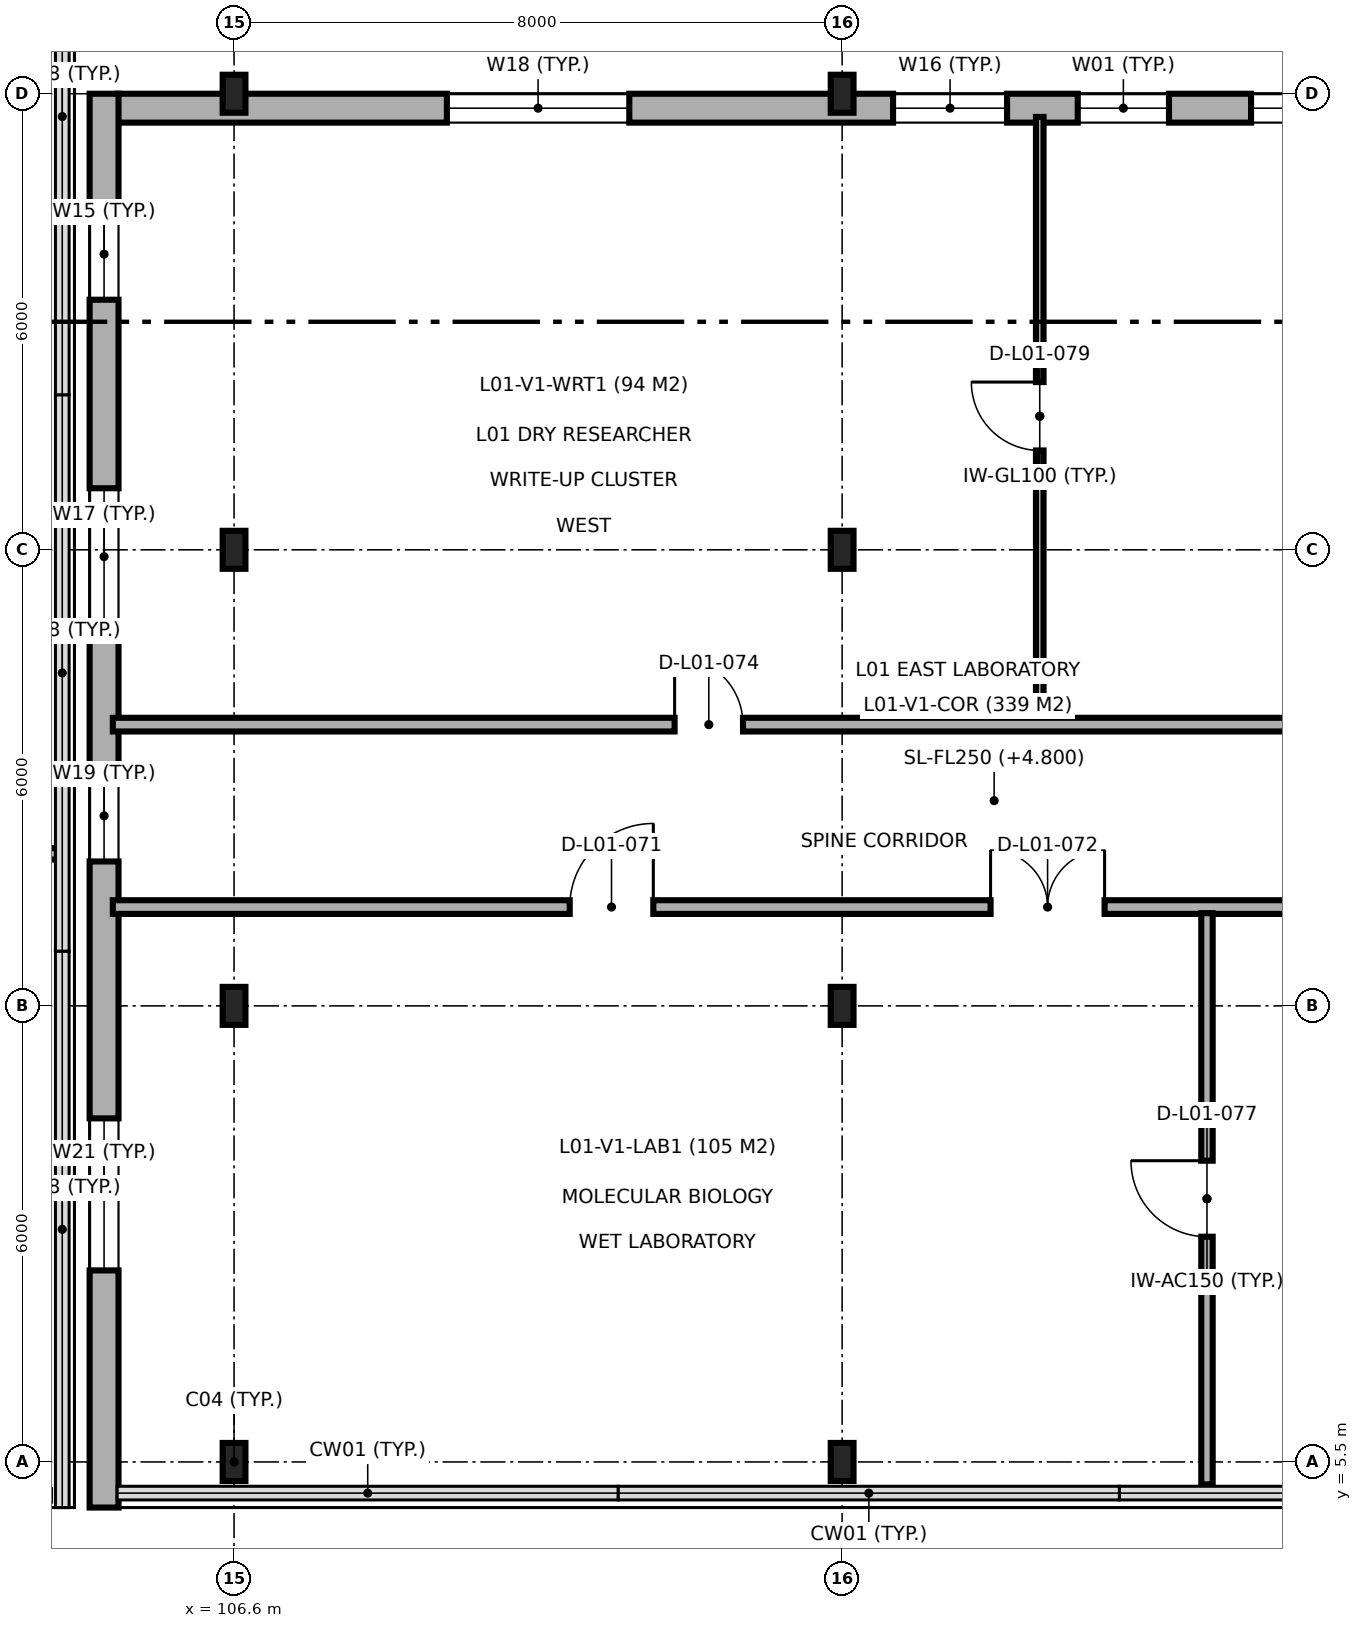
"""IFC4 building model, lengths in metres.
Left out: names, types, materials, properties, quantities, classifications, styles, units other than length and angle.
Written with IfcOpenShell. Run it as: python <this file> out.ifc"""

import sys

from ifc_helpers import new_model, si_unit, direction, frame, frame_2d, origin, origin_2d, place, context, subcontext, project, spatial, rectangle, i_section, extrude, element, fill, save


model = new_model("IFC4")
c1 = context("Model", 3, precision=1e-05, world=origin(), true_north=direction((0.0, 1.0)))
c2 = subcontext(c1, "Body", "Model", "MODEL_VIEW")
j1 = project(units=[si_unit("LENGTHUNIT", "METRE"), si_unit("PLANEANGLEUNIT", "RADIAN")], contexts=[c1])
p1 = place(None, origin())
s1 = spatial("IfcSite", under=j1, at=p1, CompositionType="ELEMENT")
p2 = place(p1, origin())
s2 = spatial("IfcBuilding", under=s1, at=p2, CompositionType="ELEMENT")
p3 = place(p2, frame((0.0, 0.0, 4.8)))
s3 = spatial("IfcBuildingStorey", under=s2, at=p3, CompositionType="ELEMENT", Elevation=4.8)
for number, where, z_axis, x_axis in (
    (1, (106.6, 5.5, 0.0), (0.0, 0.0, 1.0), (1.0, 0.0, 0.0)),
    (2, (106.6, 11.5, 0.0), (0.0, 0.0, 1.0), (1.0, 0.0, 0.0)),
    (3, (106.6, 17.5, 0.0), (0.0, 0.0, 1.0), (1.0, 0.0, 0.0)),
    (4, (106.6, 23.5, 0.0), (0.0, 0.0, 1.0), (1.0, 0.0, 0.0)),
    (5, (114.6, 5.5, 0.0), (0.0, 0.0, 1.0), (1.0, 0.0, 0.0)),
    (6, (114.6, 11.5, 0.0), (0.0, 0.0, 1.0), (1.0, 0.0, 0.0)),
    (7, (114.6, 17.5, 0.0), (0.0, 0.0, 1.0), (1.0, 0.0, 0.0)),
    (8, (114.6, 23.5, 0.0), (0.0, 0.0, 1.0), (1.0, 0.0, 0.0)),
):
    element("IfcColumn", number, at=place(p3, frame(where, z_axis=z_axis, x_axis=x_axis)), inside=s3, PredefinedType="COLUMN", context=c2, shape_type="SweptSolid", body=[
        extrude(i_section(OverallWidth=0.3, OverallDepth=0.5, WebThickness=0.014, FlangeThickness=0.028, FilletRadius=0.027, at=origin_2d()), origin(), (0.0, 0.0, 1.0), 4.5),
    ])
p4 = place(p3, frame((138.962, 23.31, 0.0), z_axis=(0.0, 0.0, 1.0), x_axis=(-1.0, 0.0, 0.0)))
e9 = element("IfcWall", 9, at=p4, inside=s3, PredefinedType="SOLIDWALL", context=c2, shape_type="SweptSolid", body=[
    extrude(rectangle(XDim=33.9, YDim=0.38, at=frame_2d((16.95, 0.0))), origin(), (0.0, 0.0, 1.0), 4.25),
])
p5 = place(p4, frame((3.682, 0.0, 0.9)))
e10 = element("IfcOpeningElement", 10, at=p5, cuts=e9, PredefinedType="OPENING", context=c2, shape_type="SweptSolid", body=[
    extrude(rectangle(XDim=1.2, YDim=2.1, at=frame_2d((0.6, 1.05))), frame((0.0, 0.2, 0.0), z_axis=(0.0, -1.0, 0.0), x_axis=(1.0, 0.0, 0.0)), (0.0, 0.0, 1.0), 0.4),
])
p6 = place(p4, frame((11.642, 0.0, 0.9)))
e11 = element("IfcOpeningElement", 11, at=p6, cuts=e9, PredefinedType="OPENING", context=c2, shape_type="SweptSolid", body=[
    extrude(rectangle(XDim=1.8, YDim=2.1, at=frame_2d((0.9, 1.05))), frame((0.0, 0.2, 0.0), z_axis=(0.0, -1.0, 0.0), x_axis=(1.0, 0.0, 0.0)), (0.0, 0.0, 1.0), 0.4),
])
p7 = place(p4, frame((17.182, 0.0, 0.9)))
e12 = element("IfcOpeningElement", 12, at=p7, cuts=e9, PredefinedType="OPENING", context=c2, shape_type="SweptSolid", body=[
    extrude(rectangle(XDim=1.8, YDim=2.1, at=frame_2d((0.9, 1.05))), frame((0.0, 0.2, 0.0), z_axis=(0.0, -1.0, 0.0), x_axis=(1.0, 0.0, 0.0)), (0.0, 0.0, 1.0), 0.4),
])
p8 = place(p4, frame((20.062, 0.0, 0.9)))
e13 = element("IfcOpeningElement", 13, at=p8, cuts=e9, PredefinedType="OPENING", context=c2, shape_type="SweptSolid", body=[
    extrude(rectangle(XDim=1.2, YDim=1.8, at=frame_2d((0.6, 0.9))), frame((0.0, 0.2, 0.0), z_axis=(0.0, -1.0, 0.0), x_axis=(1.0, 0.0, 0.0)), (0.0, 0.0, 1.0), 0.4),
])
p9 = place(p4, frame((22.192, 0.0, 0.9)))
e14 = element("IfcOpeningElement", 14, at=p9, cuts=e9, PredefinedType="OPENING", context=c2, shape_type="SweptSolid", body=[
    extrude(rectangle(XDim=1.5, YDim=1.5, at=frame_2d((0.75, 0.75))), frame((0.0, 0.2, 0.0), z_axis=(0.0, -1.0, 0.0), x_axis=(1.0, 0.0, 0.0)), (0.0, 0.0, 1.0), 0.4),
])
p10 = place(p4, frame((27.162, 0.0, 0.9)))
e15 = element("IfcOpeningElement", 15, at=p10, cuts=e9, PredefinedType="OPENING", context=c2, shape_type="SweptSolid", body=[
    extrude(rectangle(XDim=2.4, YDim=1.5, at=frame_2d((1.2, 0.75))), frame((0.0, 0.2, 0.0), z_axis=(0.0, -1.0, 0.0), x_axis=(1.0, 0.0, 0.0)), (0.0, 0.0, 1.0), 0.4),
])
p11 = place(p3, frame((104.89, 23.5, 0.0), z_axis=(0.0, 0.0, 1.0), x_axis=(0.0, -1.0, 0.0)))
e16 = element("IfcWall", 16, at=p11, inside=s3, PredefinedType="SOLIDWALL", context=c2, shape_type="SweptSolid", body=[
    extrude(rectangle(XDim=18.6, YDim=0.38, at=frame_2d((9.3, 0.0))), origin(), (0.0, 0.0, 1.0), 4.25),
])
p12 = place(p11, frame((1.51, 0.0, 0.9)))
e17 = element("IfcOpeningElement", 17, at=p12, cuts=e16, PredefinedType="OPENING", context=c2, shape_type="SweptSolid", body=[
    extrude(rectangle(XDim=1.2, YDim=1.5, at=frame_2d((0.6, 0.75))), frame((0.0, 0.2, 0.0), z_axis=(0.0, -1.0, 0.0), x_axis=(1.0, 0.0, 0.0)), (0.0, 0.0, 1.0), 0.4),
])
p13 = place(p11, frame((5.19, 0.0, 0.9)))
e18 = element("IfcOpeningElement", 18, at=p13, cuts=e16, PredefinedType="OPENING", context=c2, shape_type="SweptSolid", body=[
    extrude(rectangle(XDim=1.8, YDim=1.5, at=frame_2d((0.9, 0.75))), frame((0.0, 0.2, 0.0), z_axis=(0.0, -1.0, 0.0), x_axis=(1.0, 0.0, 0.0)), (0.0, 0.0, 1.0), 0.4),
])
p14 = place(p11, frame((8.9, 0.0, 0.9)))
e19 = element("IfcOpeningElement", 19, at=p14, cuts=e16, PredefinedType="OPENING", context=c2, shape_type="SweptSolid", body=[
    extrude(rectangle(XDim=1.2, YDim=2.4, at=frame_2d((0.6, 1.2))), frame((0.0, 0.2, 0.0), z_axis=(0.0, -1.0, 0.0), x_axis=(1.0, 0.0, 0.0)), (0.0, 0.0, 1.0), 0.4),
])
p15 = place(p11, frame((13.48, 0.0, 0.9)))
e20 = element("IfcOpeningElement", 20, at=p15, cuts=e16, PredefinedType="OPENING", context=c2, shape_type="SweptSolid", body=[
    extrude(rectangle(XDim=2.0, YDim=2.4, at=frame_2d((1.0, 1.2))), frame((0.0, 0.2, 0.0), z_axis=(0.0, -1.0, 0.0), x_axis=(1.0, 0.0, 0.0)), (0.0, 0.0, 1.0), 0.4),
])
p16 = place(p3, frame((105.005, 12.8, 0.0), z_axis=(0.0, 0.0, 1.0), x_axis=(1.0, 0.0, 0.0)))
e21 = element("IfcWall", 21, at=p16, inside=s3, PredefinedType="PARTITIONING", context=c2, shape_type="SweptSolid", body=[
    extrude(rectangle(XDim=34.495, YDim=0.18, at=frame_2d((17.248, 0.0))), origin(), (0.0, 0.0, 1.0), 4.25),
])
p17 = place(p16, frame((6.011, 0.0, 0.0)))
e22 = element("IfcOpeningElement", 22, at=p17, cuts=e21, PredefinedType="OPENING", context=c2, shape_type="SweptSolid", body=[
    extrude(rectangle(XDim=1.1, YDim=2.15, at=frame_2d((0.55, 1.075))), frame((0.0, 0.1, 0.0), z_axis=(0.0, -1.0, 0.0), x_axis=(1.0, 0.0, 0.0)), (0.0, 0.0, 1.0), 0.2),
])
p18 = place(p16, frame((11.548, 0.0, 0.0)))
e23 = element("IfcOpeningElement", 23, at=p18, cuts=e21, PredefinedType="OPENING", context=c2, shape_type="SweptSolid", body=[
    extrude(rectangle(XDim=1.5, YDim=2.2, at=frame_2d((0.75, 1.1))), frame((0.0, 0.1, 0.0), z_axis=(0.0, -1.0, 0.0), x_axis=(1.0, 0.0, 0.0)), (0.0, 0.0, 1.0), 0.2),
])
p19 = place(p16, frame((27.548, 0.0, 0.0)))
e24 = element("IfcOpeningElement", 24, at=p19, cuts=e21, PredefinedType="OPENING", context=c2, shape_type="SweptSolid", body=[
    extrude(rectangle(XDim=0.9, YDim=2.1, at=frame_2d((0.45, 1.05))), frame((0.0, 0.1, 0.0), z_axis=(0.0, -1.0, 0.0), x_axis=(1.0, 0.0, 0.0)), (0.0, 0.0, 1.0), 0.2),
])
p20 = place(p3, frame((105.005, 15.2, 0.0), z_axis=(0.0, 0.0, 1.0), x_axis=(1.0, 0.0, 0.0)))
e25 = element("IfcWall", 25, at=p20, inside=s3, PredefinedType="PARTITIONING", context=c2, shape_type="SweptSolid", body=[
    extrude(rectangle(XDim=34.495, YDim=0.18, at=frame_2d((17.248, 0.0))), origin(), (0.0, 0.0, 1.0), 4.25),
])
p21 = place(p20, frame((7.391, 0.0, 0.0)))
e26 = element("IfcOpeningElement", 26, at=p21, cuts=e25, PredefinedType="OPENING", context=c2, shape_type="SweptSolid", body=[
    extrude(rectangle(XDim=0.9, YDim=2.1, at=frame_2d((0.45, 1.05))), frame((0.0, 0.1, 0.0), z_axis=(0.0, -1.0, 0.0), x_axis=(1.0, 0.0, 0.0)), (0.0, 0.0, 1.0), 0.2),
])
p22 = place(p20, frame((18.45, 0.0, 0.0)))
e27 = element("IfcOpeningElement", 27, at=p22, cuts=e25, PredefinedType="OPENING", context=c2, shape_type="SweptSolid", body=[
    extrude(rectangle(XDim=0.95, YDim=2.1, at=frame_2d((0.475, 1.05))), frame((0.0, 0.1, 0.0), z_axis=(0.0, -1.0, 0.0), x_axis=(1.0, 0.0, 0.0)), (0.0, 0.0, 1.0), 0.2),
])
p23 = place(p20, frame((27.466, 0.0, 0.0)))
e28 = element("IfcOpeningElement", 28, at=p23, cuts=e25, PredefinedType="OPENING", context=c2, shape_type="SweptSolid", body=[
    extrude(rectangle(XDim=1.0, YDim=2.15, at=frame_2d((0.5, 1.075))), frame((0.0, 0.1, 0.0), z_axis=(0.0, -1.0, 0.0), x_axis=(1.0, 0.0, 0.0)), (0.0, 0.0, 1.0), 0.2),
])
p24 = place(p3, frame((119.4, 5.205, 0.0), z_axis=(0.0, 0.0, 1.0), x_axis=(0.0, 1.0, 0.0)))
e29 = element("IfcWall", 29, at=p24, inside=s3, PredefinedType="PARTITIONING", context=c2, shape_type="SweptSolid", body=[
    extrude(rectangle(XDim=7.515, YDim=0.15, at=frame_2d((3.757, 0.0))), origin(), (0.0, 0.0, 1.0), 4.25),
])
p25 = place(p24, frame((3.258, 0.0, 0.0)))
e30 = element("IfcOpeningElement", 30, at=p25, cuts=e29, PredefinedType="OPENING", context=c2, shape_type="SweptSolid", body=[
    extrude(rectangle(XDim=1.0, YDim=2.15, at=frame_2d((0.5, 1.075))), frame((0.0, 0.085, 0.0), z_axis=(0.0, -1.0, 0.0), x_axis=(1.0, 0.0, 0.0)), (0.0, 0.0, 1.0), 0.17),
])
p26 = place(p3, frame((117.2, 15.32, 0.0), z_axis=(0.0, 0.0, 1.0), x_axis=(0.0, 1.0, 0.0)))
e31 = element("IfcWall", 31, at=p26, inside=s3, PredefinedType="PARTITIONING", context=c2, shape_type="SweptSolid", body=[
    extrude(rectangle(XDim=7.875, YDim=0.1, at=frame_2d((3.938, 0.0))), origin(), (0.0, 0.0, 1.0), 4.01),
])
p27 = place(p26, frame((3.487, 0.0, 0.0)))
e32 = element("IfcOpeningElement", 32, at=p27, cuts=e31, PredefinedType="OPENING", context=c2, shape_type="SweptSolid", body=[
    extrude(rectangle(XDim=0.9, YDim=2.1, at=frame_2d((0.45, 1.05))), frame((0.0, 0.06, 0.0), z_axis=(0.0, -1.0, 0.0), x_axis=(1.0, 0.0, 0.0)), (0.0, 0.0, 1.0), 0.12),
])
p28 = place(p3, frame((96.65, 13.5, 0.0), z_axis=(0.0, 0.0, 1.0), x_axis=(1.0, 0.0, 0.0)))
e33 = element("IfcWall", 33, at=p28, inside=s3, PredefinedType="PARTITIONING", context=c2, shape_type="SweptSolid", body=[
    extrude(rectangle(XDim=7.63, YDim=0.15, at=frame_2d((3.815, 0.0))), origin(), (0.0, 0.0, 1.0), 4.25),
])
p29 = place(p7, origin())
e34 = element("IfcWindow", 34, at=p29, inside=s3, PartitioningType="SINGLE_PANEL", PredefinedType="WINDOW", context=c2, shape_type="SweptSolid", body=[
    extrude(rectangle(XDim=1.8, YDim=2.1, at=frame_2d((0.9, 1.05))), frame((0.0, 0.03, 0.0), z_axis=(0.0, -1.0, 0.0), x_axis=(1.0, 0.0, 0.0)), (0.0, 0.0, 1.0), 0.06),
])
fill(e12, e34)
p30 = place(p8, origin())
e35 = element("IfcWindow", 35, at=p30, inside=s3, PartitioningType="SINGLE_PANEL", PredefinedType="WINDOW", context=c2, shape_type="SweptSolid", body=[
    extrude(rectangle(XDim=1.2, YDim=1.8, at=frame_2d((0.6, 0.9))), frame((0.0, 0.03, 0.0), z_axis=(0.0, -1.0, 0.0), x_axis=(1.0, 0.0, 0.0)), (0.0, 0.0, 1.0), 0.06),
])
fill(e13, e35)
p31 = place(p9, origin())
e36 = element("IfcWindow", 36, at=p31, inside=s3, PartitioningType="SINGLE_PANEL", PredefinedType="WINDOW", context=c2, shape_type="SweptSolid", body=[
    extrude(rectangle(XDim=1.5, YDim=1.5, at=frame_2d((0.75, 0.75))), frame((0.0, 0.03, 0.0), z_axis=(0.0, -1.0, 0.0), x_axis=(1.0, 0.0, 0.0)), (0.0, 0.0, 1.0), 0.06),
])
fill(e14, e36)
p32 = place(p10, origin())
e37 = element("IfcWindow", 37, at=p32, inside=s3, PartitioningType="SINGLE_PANEL", PredefinedType="WINDOW", context=c2, shape_type="SweptSolid", body=[
    extrude(rectangle(XDim=2.4, YDim=1.5, at=frame_2d((1.2, 0.75))), frame((0.0, 0.03, 0.0), z_axis=(0.0, -1.0, 0.0), x_axis=(1.0, 0.0, 0.0)), (0.0, 0.0, 1.0), 0.06),
])
fill(e15, e37)
p33 = place(p12, origin())
e38 = element("IfcWindow", 38, at=p33, inside=s3, PartitioningType="SINGLE_PANEL", PredefinedType="WINDOW", context=c2, shape_type="SweptSolid", body=[
    extrude(rectangle(XDim=1.2, YDim=1.5, at=frame_2d((0.6, 0.75))), frame((0.0, 0.03, 0.0), z_axis=(0.0, -1.0, 0.0), x_axis=(1.0, 0.0, 0.0)), (0.0, 0.0, 1.0), 0.06),
])
fill(e17, e38)
p34 = place(p13, origin())
e39 = element("IfcWindow", 39, at=p34, inside=s3, PartitioningType="SINGLE_PANEL", PredefinedType="WINDOW", context=c2, shape_type="SweptSolid", body=[
    extrude(rectangle(XDim=1.8, YDim=1.5, at=frame_2d((0.9, 0.75))), frame((0.0, 0.03, 0.0), z_axis=(0.0, -1.0, 0.0), x_axis=(1.0, 0.0, 0.0)), (0.0, 0.0, 1.0), 0.06),
])
fill(e18, e39)
p35 = place(p14, origin())
e40 = element("IfcWindow", 40, at=p35, inside=s3, PartitioningType="SINGLE_PANEL", PredefinedType="WINDOW", context=c2, shape_type="SweptSolid", body=[
    extrude(rectangle(XDim=1.2, YDim=2.4, at=frame_2d((0.6, 1.2))), frame((0.0, 0.03, 0.0), z_axis=(0.0, -1.0, 0.0), x_axis=(1.0, 0.0, 0.0)), (0.0, 0.0, 1.0), 0.06),
])
fill(e19, e40)
p36 = place(p15, origin())
e41 = element("IfcWindow", 41, at=p36, inside=s3, PartitioningType="SINGLE_PANEL", PredefinedType="WINDOW", context=c2, shape_type="SweptSolid", body=[
    extrude(rectangle(XDim=2.0, YDim=2.4, at=frame_2d((1.0, 1.2))), frame((0.0, 0.03, 0.0), z_axis=(0.0, -1.0, 0.0), x_axis=(1.0, 0.0, 0.0)), (0.0, 0.0, 1.0), 0.06),
])
fill(e20, e41)
p37 = place(p17, origin())
e42 = element("IfcDoor", 42, at=p37, inside=s3, OperationType="SINGLE_SWING_RIGHT", PredefinedType="DOOR", context=c2, shape_type="SweptSolid", body=[
    extrude(rectangle(XDim=1.1, YDim=2.15, at=frame_2d((0.55, 1.075))), frame((0.0, 0.025, 0.0), z_axis=(0.0, -1.0, 0.0), x_axis=(1.0, 0.0, 0.0)), (0.0, 0.0, 1.0), 0.05),
])
fill(e22, e42)
p38 = place(p18, origin())
e43 = element("IfcDoor", 43, at=p38, inside=s3, OperationType="DOUBLE_DOOR_SINGLE_SWING", PredefinedType="DOOR", context=c2, shape_type="SweptSolid", body=[
    extrude(rectangle(XDim=1.5, YDim=2.2, at=frame_2d((0.75, 1.1))), frame((0.0, 0.025, 0.0), z_axis=(0.0, -1.0, 0.0), x_axis=(1.0, 0.0, 0.0)), (0.0, 0.0, 1.0), 0.05),
])
fill(e23, e43)
p39 = place(p21, origin())
e44 = element("IfcDoor", 44, at=p39, inside=s3, OperationType="SINGLE_SWING_LEFT", PredefinedType="DOOR", context=c2, shape_type="SweptSolid", body=[
    extrude(rectangle(XDim=0.9, YDim=2.1, at=frame_2d((0.45, 1.05))), frame((0.0, 0.025, 0.0), z_axis=(0.0, -1.0, 0.0), x_axis=(1.0, 0.0, 0.0)), (0.0, 0.0, 1.0), 0.05),
])
fill(e26, e44)
p40 = place(p25, origin())
e45 = element("IfcDoor", 45, at=p40, inside=s3, OperationType="SINGLE_SWING_RIGHT", PredefinedType="DOOR", context=c2, shape_type="SweptSolid", body=[
    extrude(rectangle(XDim=1.0, YDim=2.15, at=frame_2d((0.5, 1.075))), frame((0.0, 0.025, 0.0), z_axis=(0.0, -1.0, 0.0), x_axis=(1.0, 0.0, 0.0)), (0.0, 0.0, 1.0), 0.05),
])
fill(e30, e45)
p41 = place(p27, origin())
e46 = element("IfcDoor", 46, at=p41, inside=s3, OperationType="SINGLE_SWING_RIGHT", PredefinedType="DOOR", context=c2, shape_type="SweptSolid", body=[
    extrude(rectangle(XDim=0.9, YDim=2.1, at=frame_2d((0.45, 1.05))), frame((0.0, 0.025, 0.0), z_axis=(0.0, -1.0, 0.0), x_axis=(1.0, 0.0, 0.0)), (0.0, 0.0, 1.0), 0.05),
])
fill(e32, e46)
save(model, sys.argv[1])
